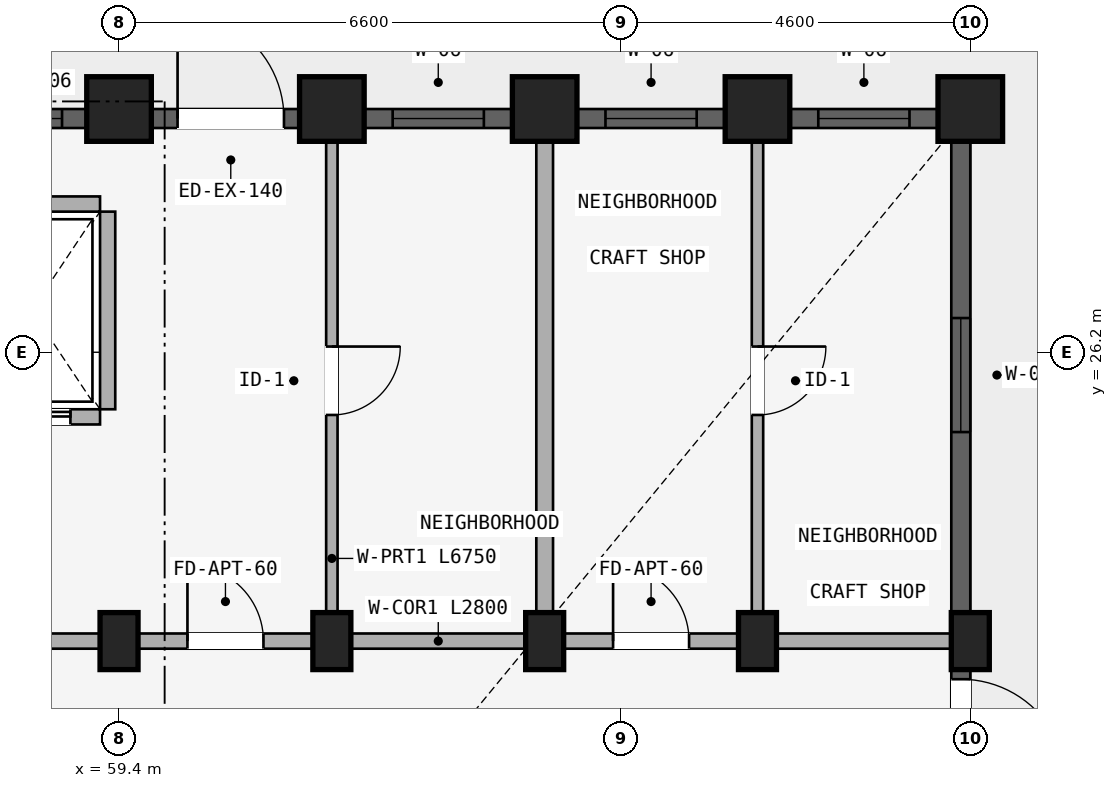
"""IFC4 building model, lengths in metres.
Left out: names, types, materials, properties, quantities, classifications, styles, units other than length and angle.
Written with IfcOpenShell. Run it as: python <this file> out.ifc"""

import sys

from ifc_helpers import new_model, si_unit, direction, frame, frame_2d, origin, origin_2d, place, context, subcontext, project, spatial, rectangle, extrude, element, fill, save


model = new_model("IFC4")
c1 = context("Model", 3, precision=1e-05, world=origin(), true_north=direction((0.0, 1.0)))
c2 = subcontext(c1, "Body", "Model", "MODEL_VIEW")
j1 = project(units=[si_unit("LENGTHUNIT", "METRE"), si_unit("PLANEANGLEUNIT", "RADIAN")], contexts=[c1])
p1 = place(None, origin())
s1 = spatial("IfcSite", under=j1, at=p1, CompositionType="ELEMENT")
p2 = place(p1, origin())
s2 = spatial("IfcBuilding", under=s1, at=p2, CompositionType="ELEMENT")
p3 = place(p2, origin())
s3 = spatial("IfcBuildingStorey", under=s2, at=p3, CompositionType="ELEMENT", Elevation=0.0)
p4 = place(p3, frame((59.4, 29.4, 0.0), z_axis=(0.0, 0.0, 1.0), x_axis=(1.0, 0.0, 0.0)))
e1 = element("IfcColumn", 1, at=p4, inside=s3, PredefinedType="COLUMN", context=c2, shape_type="SweptSolid", body=[
    extrude(rectangle(XDim=0.85, YDim=0.85, at=origin_2d()), origin(), (0.0, 0.0, 1.0), 4.15),
])
p5 = place(p3, frame((59.4, 22.4, 0.0), z_axis=(0.0, 0.0, 1.0), x_axis=(1.0, 0.0, 0.0)))
e2 = element("IfcColumn", 2, at=p5, inside=s3, PredefinedType="COLUMN", context=c2, shape_type="SweptSolid", body=[
    extrude(rectangle(XDim=0.5, YDim=0.75, at=origin_2d()), origin(), (0.0, 0.0, 1.0), 4.15),
])
p6 = place(p3, frame((62.2, 29.4, 0.0), z_axis=(0.0, 0.0, 1.0), x_axis=(1.0, 0.0, 0.0)))
e3 = element("IfcColumn", 3, at=p6, inside=s3, PredefinedType="COLUMN", context=c2, shape_type="SweptSolid", body=[
    extrude(rectangle(XDim=0.85, YDim=0.85, at=origin_2d()), origin(), (0.0, 0.0, 1.0), 4.15),
])
p7 = place(p3, frame((62.2, 22.4, 0.0), z_axis=(0.0, 0.0, 1.0), x_axis=(1.0, 0.0, 0.0)))
e4 = element("IfcColumn", 4, at=p7, inside=s3, PredefinedType="COLUMN", context=c2, shape_type="SweptSolid", body=[
    extrude(rectangle(XDim=0.5, YDim=0.75, at=origin_2d()), origin(), (0.0, 0.0, 1.0), 4.15),
])
p8 = place(p3, frame((65.0, 29.4, 0.0), z_axis=(0.0, 0.0, 1.0), x_axis=(1.0, 0.0, 0.0)))
e5 = element("IfcColumn", 5, at=p8, inside=s3, PredefinedType="COLUMN", context=c2, shape_type="SweptSolid", body=[
    extrude(rectangle(XDim=0.85, YDim=0.85, at=origin_2d()), origin(), (0.0, 0.0, 1.0), 4.15),
])
p9 = place(p3, frame((65.0, 22.4, 0.0), z_axis=(0.0, 0.0, 1.0), x_axis=(1.0, 0.0, 0.0)))
e6 = element("IfcColumn", 6, at=p9, inside=s3, PredefinedType="COLUMN", context=c2, shape_type="SweptSolid", body=[
    extrude(rectangle(XDim=0.5, YDim=0.75, at=origin_2d()), origin(), (0.0, 0.0, 1.0), 4.15),
])
p10 = place(p3, frame((67.8, 29.4, 0.0), z_axis=(0.0, 0.0, 1.0), x_axis=(1.0, 0.0, 0.0)))
e7 = element("IfcColumn", 7, at=p10, inside=s3, PredefinedType="COLUMN", context=c2, shape_type="SweptSolid", body=[
    extrude(rectangle(XDim=0.85, YDim=0.85, at=origin_2d()), origin(), (0.0, 0.0, 1.0), 4.15),
])
p11 = place(p3, frame((67.8, 22.4, 0.0), z_axis=(0.0, 0.0, 1.0), x_axis=(1.0, 0.0, 0.0)))
e8 = element("IfcColumn", 8, at=p11, inside=s3, PredefinedType="COLUMN", context=c2, shape_type="SweptSolid", body=[
    extrude(rectangle(XDim=0.5, YDim=0.75, at=origin_2d()), origin(), (0.0, 0.0, 1.0), 4.15),
])
p12 = place(p3, frame((70.6, 29.4, 0.0), z_axis=(0.0, 0.0, 1.0), x_axis=(1.0, 0.0, 0.0)))
e9 = element("IfcColumn", 9, at=p12, inside=s3, PredefinedType="COLUMN", context=c2, shape_type="SweptSolid", body=[
    extrude(rectangle(XDim=0.85, YDim=0.85, at=origin_2d()), origin(), (0.0, 0.0, 1.0), 4.15),
])
p13 = place(p3, frame((70.6, 22.4, 0.0), z_axis=(0.0, 0.0, 1.0), x_axis=(1.0, 0.0, 0.0)))
e10 = element("IfcColumn", 10, at=p13, inside=s3, PredefinedType="COLUMN", context=c2, shape_type="SweptSolid", body=[
    extrude(rectangle(XDim=0.5, YDim=0.75, at=origin_2d()), origin(), (0.0, 0.0, 1.0), 4.15),
])
p14 = place(p3, frame((59.25, 28.05, 0.0), z_axis=(0.0, 0.0, 1.0), x_axis=(0.0, -1.0, 0.0)))
e11 = element("IfcWall", 11, at=p14, inside=s3, PredefinedType="STANDARD", context=c2, shape_type="SweptSolid", body=[
    extrude(rectangle(XDim=2.6, YDim=0.2, at=frame_2d((1.3, 0.0))), origin(), (0.0, 0.0, 1.0), 3.492),
])
p15 = place(p3, frame((57.35, 28.15, 0.0), z_axis=(0.0, 0.0, 1.0), x_axis=(1.0, 0.0, 0.0)))
e12 = element("IfcWall", 12, at=p15, inside=s3, PredefinedType="STANDARD", context=c2, shape_type="SweptSolid", body=[
    extrude(rectangle(XDim=1.8, YDim=0.2, at=frame_2d((0.9, 0.0))), origin(), (0.0, 0.0, 1.0), 4.15),
])
p16 = place(p3, frame((57.35, 25.35, 0.0), z_axis=(0.0, 0.0, 1.0), x_axis=(1.0, 0.0, 0.0)))
e13 = element("IfcWall", 13, at=p16, inside=s3, PredefinedType="STANDARD", context=c2, shape_type="SweptSolid", body=[
    extrude(rectangle(XDim=1.8, YDim=0.2, at=frame_2d((0.9, 0.0))), origin(), (0.0, 0.0, 1.0), 4.15),
])
p17 = place(p16, frame((0.39, 0.0, 0.0)))
e14 = element("IfcOpeningElement", 14, at=p17, cuts=e13, PredefinedType="OPENING", context=c2, shape_type="SweptSolid", body=[
    extrude(rectangle(XDim=1.02, YDim=2.15, at=frame_2d((0.51, 1.075))), frame((0.0, 0.11, 0.0), z_axis=(0.0, -1.0, 0.0), x_axis=(1.0, 0.0, 0.0)), (0.0, 0.0, 1.0), 0.22),
])
p18 = place(p3, frame((53.75, 22.4, 0.0), z_axis=(0.0, 0.0, 1.0), x_axis=(1.0, 0.0, 0.0)))
e15 = element("IfcWall", 15, at=p18, inside=s3, PredefinedType="STANDARD", context=c2, shape_type="SweptSolid", body=[
    extrude(rectangle(XDim=5.6, YDim=0.2, at=frame_2d((2.8, 0.0))), origin(), (0.0, 0.0, 1.0), 3.492),
])
p19 = place(p18, frame((1.91, 0.0, 0.0)))
e16 = element("IfcOpeningElement", 16, at=p19, cuts=e15, PredefinedType="OPENING", context=c2, shape_type="SweptSolid", body=[
    extrude(rectangle(XDim=1.22, YDim=2.15, at=frame_2d((0.61, 1.075))), frame((0.0, 0.11, 0.0), z_axis=(0.0, -1.0, 0.0), x_axis=(1.0, 0.0, 0.0)), (0.0, 0.0, 1.0), 0.22),
])
p20 = place(p3, frame((59.4, 22.4, 0.0), z_axis=(0.0, 0.0, 1.0), x_axis=(1.0, 0.0, 0.0)))
e17 = element("IfcWall", 17, at=p20, inside=s3, PredefinedType="STANDARD", context=c2, shape_type="SweptSolid", body=[
    extrude(rectangle(XDim=2.8, YDim=0.2, at=frame_2d((1.4, 0.0))), origin(), (0.0, 0.0, 1.0), 3.492),
])
p21 = place(p20, frame((0.9, 0.0, 0.0)))
e18 = element("IfcOpeningElement", 18, at=p21, cuts=e17, PredefinedType="OPENING", context=c2, shape_type="SweptSolid", body=[
    extrude(rectangle(XDim=1.0, YDim=2.15, at=frame_2d((0.5, 1.075))), frame((0.0, 0.11, 0.0), z_axis=(0.0, -1.0, 0.0), x_axis=(1.0, 0.0, 0.0)), (0.0, 0.0, 1.0), 0.22),
])
p22 = place(p3, frame((62.2, 22.4, 0.0), z_axis=(0.0, 0.0, 1.0), x_axis=(1.0, 0.0, 0.0)))
e19 = element("IfcWall", 19, at=p22, inside=s3, PredefinedType="STANDARD", context=c2, shape_type="SweptSolid", body=[
    extrude(rectangle(XDim=2.8, YDim=0.2, at=frame_2d((1.4, 0.0))), origin(), (0.0, 0.0, 1.0), 3.492),
])
p23 = place(p3, frame((65.0, 22.4, 0.0), z_axis=(0.0, 0.0, 1.0), x_axis=(1.0, 0.0, 0.0)))
e20 = element("IfcWall", 20, at=p23, inside=s3, PredefinedType="STANDARD", context=c2, shape_type="SweptSolid", body=[
    extrude(rectangle(XDim=2.8, YDim=0.2, at=frame_2d((1.4, 0.0))), origin(), (0.0, 0.0, 1.0), 3.492),
])
p24 = place(p23, frame((0.9, 0.0, 0.0)))
e21 = element("IfcOpeningElement", 21, at=p24, cuts=e20, PredefinedType="OPENING", context=c2, shape_type="SweptSolid", body=[
    extrude(rectangle(XDim=1.0, YDim=2.15, at=frame_2d((0.5, 1.075))), frame((0.0, 0.11, 0.0), z_axis=(0.0, -1.0, 0.0), x_axis=(1.0, 0.0, 0.0)), (0.0, 0.0, 1.0), 0.22),
])
p25 = place(p3, frame((67.8, 22.4, 0.0), z_axis=(0.0, 0.0, 1.0), x_axis=(1.0, 0.0, 0.0)))
e22 = element("IfcWall", 22, at=p25, inside=s3, PredefinedType="STANDARD", context=c2, shape_type="SweptSolid", body=[
    extrude(rectangle(XDim=2.8, YDim=0.2, at=frame_2d((1.4, 0.0))), origin(), (0.0, 0.0, 1.0), 3.492),
])
p26 = place(p3, frame((62.2, 29.2, 0.0), z_axis=(0.0, 0.0, 1.0), x_axis=(0.0, -1.0, 0.0)))
e23 = element("IfcWall", 23, at=p26, inside=s3, PredefinedType="PARTITIONING", context=c2, shape_type="SweptSolid", body=[
    extrude(rectangle(XDim=6.75, YDim=0.15, at=frame_2d((3.375, 0.0))), origin(), (0.0, 0.0, 1.0), 3.492),
])
p27 = place(p26, frame((2.925, 0.0, 0.0)))
e24 = element("IfcOpeningElement", 24, at=p27, cuts=e23, PredefinedType="OPENING", context=c2, shape_type="SweptSolid", body=[
    extrude(rectangle(XDim=0.9, YDim=2.1, at=frame_2d((0.45, 1.05))), frame((0.0, 0.085, 0.0), z_axis=(0.0, -1.0, 0.0), x_axis=(1.0, 0.0, 0.0)), (0.0, 0.0, 1.0), 0.17),
])
p28 = place(p3, frame((65.0, 29.2, 0.0), z_axis=(0.0, 0.0, 1.0), x_axis=(0.0, -1.0, 0.0)))
e25 = element("IfcWall", 25, at=p28, inside=s3, PredefinedType="STANDARD", context=c2, shape_type="SweptSolid", body=[
    extrude(rectangle(XDim=6.75, YDim=0.22, at=frame_2d((3.375, 0.0))), origin(), (0.0, 0.0, 1.0), 3.492),
])
p29 = place(p3, frame((67.8, 29.2, 0.0), z_axis=(0.0, 0.0, 1.0), x_axis=(0.0, -1.0, 0.0)))
e26 = element("IfcWall", 26, at=p29, inside=s3, PredefinedType="PARTITIONING", context=c2, shape_type="SweptSolid", body=[
    extrude(rectangle(XDim=6.75, YDim=0.15, at=frame_2d((3.375, 0.0))), origin(), (0.0, 0.0, 1.0), 3.492),
])
p30 = place(p29, frame((2.925, 0.0, 0.0)))
e27 = element("IfcOpeningElement", 27, at=p30, cuts=e26, PredefinedType="OPENING", context=c2, shape_type="SweptSolid", body=[
    extrude(rectangle(XDim=0.9, YDim=2.1, at=frame_2d((0.45, 1.05))), frame((0.0, 0.085, 0.0), z_axis=(0.0, -1.0, 0.0), x_axis=(1.0, 0.0, 0.0)), (0.0, 0.0, 1.0), 0.17),
])
p31 = place(p3, frame((56.628, 29.275, 0.0), z_axis=(0.0, 0.0, 1.0), x_axis=(1.0, 0.0, 0.0)))
e28 = element("IfcWall", 28, at=p31, inside=s3, PredefinedType="STANDARD", context=c2, shape_type="SweptSolid", body=[
    extrude(rectangle(XDim=2.422, YDim=0.25, at=frame_2d((1.211, 0.0))), origin(), (0.0, 0.0, 1.0), 3.692),
])
p32 = place(p31, frame((0.822, 0.0, 0.88)))
e29 = element("IfcOpeningElement", 29, at=p32, cuts=e28, PredefinedType="OPENING", context=c2, shape_type="SweptSolid", body=[
    extrude(rectangle(XDim=1.2, YDim=1.5, at=frame_2d((0.6, 0.75))), frame((0.0, 0.135, 0.0), z_axis=(0.0, -1.0, 0.0), x_axis=(1.0, 0.0, 0.0)), (0.0, 0.0, 1.0), 0.27),
])
p33 = place(p3, frame((59.82, 29.275, 0.0), z_axis=(0.0, 0.0, 1.0), x_axis=(1.0, 0.0, 0.0)))
e30 = element("IfcWall", 30, at=p33, inside=s3, PredefinedType="STANDARD", context=c2, shape_type="SweptSolid", body=[
    extrude(rectangle(XDim=1.96, YDim=0.25, at=frame_2d((0.98, 0.0))), origin(), (0.0, 0.0, 1.0), 3.692),
])
p34 = place(p33, frame((0.35, 0.0, 0.0)))
e31 = element("IfcOpeningElement", 31, at=p34, cuts=e30, PredefinedType="OPENING", context=c2, shape_type="SweptSolid", body=[
    extrude(rectangle(XDim=1.4, YDim=2.15, at=frame_2d((0.7, 1.075))), frame((0.0, 0.135, 0.0), z_axis=(0.0, -1.0, 0.0), x_axis=(1.0, 0.0, 0.0)), (0.0, 0.0, 1.0), 0.27),
])
p35 = place(p3, frame((62.62, 29.275, 0.0), z_axis=(0.0, 0.0, 1.0), x_axis=(1.0, 0.0, 0.0)))
e32 = element("IfcWall", 32, at=p35, inside=s3, PredefinedType="STANDARD", context=c2, shape_type="SweptSolid", body=[
    extrude(rectangle(XDim=1.96, YDim=0.25, at=frame_2d((0.98, 0.0))), origin(), (0.0, 0.0, 1.0), 3.692),
])
p36 = place(p35, frame((0.38, 0.0, 0.88)))
e33 = element("IfcOpeningElement", 33, at=p36, cuts=e32, PredefinedType="OPENING", context=c2, shape_type="SweptSolid", body=[
    extrude(rectangle(XDim=1.2, YDim=1.5, at=frame_2d((0.6, 0.75))), frame((0.0, 0.135, 0.0), z_axis=(0.0, -1.0, 0.0), x_axis=(1.0, 0.0, 0.0)), (0.0, 0.0, 1.0), 0.27),
])
p37 = place(p3, frame((65.42, 29.275, 0.0), z_axis=(0.0, 0.0, 1.0), x_axis=(1.0, 0.0, 0.0)))
e34 = element("IfcWall", 34, at=p37, inside=s3, PredefinedType="STANDARD", context=c2, shape_type="SweptSolid", body=[
    extrude(rectangle(XDim=1.96, YDim=0.25, at=frame_2d((0.98, 0.0))), origin(), (0.0, 0.0, 1.0), 3.692),
])
p38 = place(p37, frame((0.38, 0.0, 0.88)))
e35 = element("IfcOpeningElement", 35, at=p38, cuts=e34, PredefinedType="OPENING", context=c2, shape_type="SweptSolid", body=[
    extrude(rectangle(XDim=1.2, YDim=1.5, at=frame_2d((0.6, 0.75))), frame((0.0, 0.135, 0.0), z_axis=(0.0, -1.0, 0.0), x_axis=(1.0, 0.0, 0.0)), (0.0, 0.0, 1.0), 0.27),
])
p39 = place(p3, frame((68.22, 29.275, 0.0), z_axis=(0.0, 0.0, 1.0), x_axis=(1.0, 0.0, 0.0)))
e36 = element("IfcWall", 36, at=p39, inside=s3, PredefinedType="STANDARD", context=c2, shape_type="SweptSolid", body=[
    extrude(rectangle(XDim=1.96, YDim=0.25, at=frame_2d((0.98, 0.0))), origin(), (0.0, 0.0, 1.0), 3.692),
])
p40 = place(p39, frame((0.38, 0.0, 0.88)))
e37 = element("IfcOpeningElement", 37, at=p40, cuts=e36, PredefinedType="OPENING", context=c2, shape_type="SweptSolid", body=[
    extrude(rectangle(XDim=1.2, YDim=1.5, at=frame_2d((0.6, 0.75))), frame((0.0, 0.135, 0.0), z_axis=(0.0, -1.0, 0.0), x_axis=(1.0, 0.0, 0.0)), (0.0, 0.0, 1.0), 0.27),
])
p41 = place(p3, frame((70.475, 28.98, 0.0), z_axis=(0.0, 0.0, 1.0), x_axis=(0.0, -1.0, 0.0)))
e38 = element("IfcWall", 38, at=p41, inside=s3, PredefinedType="STANDARD", context=c2, shape_type="SweptSolid", body=[
    extrude(rectangle(XDim=6.201, YDim=0.25, at=frame_2d((3.101, 0.0))), origin(), (0.0, 0.0, 1.0), 3.492),
])
p42 = place(p41, frame((2.33, 0.0, 0.88)))
e39 = element("IfcOpeningElement", 39, at=p42, cuts=e38, PredefinedType="OPENING", context=c2, shape_type="SweptSolid", body=[
    extrude(rectangle(XDim=1.5, YDim=1.65, at=frame_2d((0.75, 0.825))), frame((0.0, 0.135, 0.0), z_axis=(0.0, -1.0, 0.0), x_axis=(1.0, 0.0, 0.0)), (0.0, 0.0, 1.0), 0.27),
])
p43 = place(p3, frame((70.475, 22.021, 0.0), z_axis=(0.0, 0.0, 1.0), x_axis=(0.0, -1.0, 0.0)))
e40 = element("IfcWall", 40, at=p43, inside=s3, PredefinedType="STANDARD", context=c2, shape_type="SweptSolid", body=[
    extrude(rectangle(XDim=1.643, YDim=0.25, at=frame_2d((0.822, 0.0))), origin(), (0.0, 0.0, 1.0), 3.492),
])
p44 = place(p43, frame((0.123, 0.0, 0.0)))
e41 = element("IfcOpeningElement", 41, at=p44, cuts=e40, PredefinedType="OPENING", context=c2, shape_type="SweptSolid", body=[
    extrude(rectangle(XDim=1.4, YDim=2.15, at=frame_2d((0.7, 1.075))), frame((0.0, 0.135, 0.0), z_axis=(0.0, -1.0, 0.0), x_axis=(1.0, 0.0, 0.0)), (0.0, 0.0, 1.0), 0.27),
])
p45 = place(p32, origin())
e42 = element("IfcWindow", 42, at=p45, inside=s3, PartitioningType="SINGLE_PANEL", PredefinedType="WINDOW", context=c2, shape_type="SweptSolid", body=[
    extrude(rectangle(XDim=1.2, YDim=1.5, at=frame_2d((0.6, 0.75))), frame((0.0, 0.03, 0.0), z_axis=(0.0, -1.0, 0.0), x_axis=(1.0, 0.0, 0.0)), (0.0, 0.0, 1.0), 0.06),
])
fill(e29, e42)
p46 = place(p36, origin())
e43 = element("IfcWindow", 43, at=p46, inside=s3, PartitioningType="SINGLE_PANEL", PredefinedType="WINDOW", context=c2, shape_type="SweptSolid", body=[
    extrude(rectangle(XDim=1.2, YDim=1.5, at=frame_2d((0.6, 0.75))), frame((0.0, 0.03, 0.0), z_axis=(0.0, -1.0, 0.0), x_axis=(1.0, 0.0, 0.0)), (0.0, 0.0, 1.0), 0.06),
])
fill(e33, e43)
p47 = place(p38, origin())
e44 = element("IfcWindow", 44, at=p47, inside=s3, PartitioningType="SINGLE_PANEL", PredefinedType="WINDOW", context=c2, shape_type="SweptSolid", body=[
    extrude(rectangle(XDim=1.2, YDim=1.5, at=frame_2d((0.6, 0.75))), frame((0.0, 0.03, 0.0), z_axis=(0.0, -1.0, 0.0), x_axis=(1.0, 0.0, 0.0)), (0.0, 0.0, 1.0), 0.06),
])
fill(e35, e44)
p48 = place(p40, origin())
e45 = element("IfcWindow", 45, at=p48, inside=s3, PartitioningType="SINGLE_PANEL", PredefinedType="WINDOW", context=c2, shape_type="SweptSolid", body=[
    extrude(rectangle(XDim=1.2, YDim=1.5, at=frame_2d((0.6, 0.75))), frame((0.0, 0.03, 0.0), z_axis=(0.0, -1.0, 0.0), x_axis=(1.0, 0.0, 0.0)), (0.0, 0.0, 1.0), 0.06),
])
fill(e37, e45)
p49 = place(p42, origin())
e46 = element("IfcWindow", 46, at=p49, inside=s3, PartitioningType="DOUBLE_PANEL_VERTICAL", PredefinedType="WINDOW", context=c2, shape_type="SweptSolid", body=[
    extrude(rectangle(XDim=1.5, YDim=1.65, at=frame_2d((0.75, 0.825))), frame((0.0, 0.03, 0.0), z_axis=(0.0, -1.0, 0.0), x_axis=(1.0, 0.0, 0.0)), (0.0, 0.0, 1.0), 0.06),
])
fill(e39, e46)
p50 = place(p17, origin())
e47 = element("IfcDoor", 47, at=p50, inside=s3, OperationType="SLIDING_TO_RIGHT", PredefinedType="DOOR", context=c2, shape_type="SweptSolid", body=[
    extrude(rectangle(XDim=1.02, YDim=2.15, at=frame_2d((0.51, 1.075))), frame((0.0, 0.025, 0.0), z_axis=(0.0, -1.0, 0.0), x_axis=(1.0, 0.0, 0.0)), (0.0, 0.0, 1.0), 0.05),
])
fill(e14, e47)
p51 = place(p21, frame((1.0, 0.0, 0.0), z_axis=(0.0, 0.0, 1.0), x_axis=(-1.0, 0.0, 0.0)))
e48 = element("IfcDoor", 48, at=p51, inside=s3, OperationType="SINGLE_SWING_RIGHT", PredefinedType="DOOR", context=c2, shape_type="SweptSolid", body=[
    extrude(rectangle(XDim=1.0, YDim=2.15, at=frame_2d((0.5, 1.075))), frame((0.0, 0.025, 0.0), z_axis=(0.0, -1.0, 0.0), x_axis=(1.0, 0.0, 0.0)), (0.0, 0.0, 1.0), 0.05),
])
fill(e18, e48)
p52 = place(p24, frame((1.0, 0.0, 0.0), z_axis=(0.0, 0.0, 1.0), x_axis=(-1.0, 0.0, 0.0)))
e49 = element("IfcDoor", 49, at=p52, inside=s3, OperationType="SINGLE_SWING_RIGHT", PredefinedType="DOOR", context=c2, shape_type="SweptSolid", body=[
    extrude(rectangle(XDim=1.0, YDim=2.15, at=frame_2d((0.5, 1.075))), frame((0.0, 0.025, 0.0), z_axis=(0.0, -1.0, 0.0), x_axis=(1.0, 0.0, 0.0)), (0.0, 0.0, 1.0), 0.05),
])
fill(e21, e49)
p53 = place(p27, origin())
e50 = element("IfcDoor", 50, at=p53, inside=s3, OperationType="SINGLE_SWING_LEFT", PredefinedType="DOOR", context=c2, shape_type="SweptSolid", body=[
    extrude(rectangle(XDim=0.9, YDim=2.1, at=frame_2d((0.45, 1.05))), frame((0.0, 0.025, 0.0), z_axis=(0.0, -1.0, 0.0), x_axis=(1.0, 0.0, 0.0)), (0.0, 0.0, 1.0), 0.05),
])
fill(e24, e50)
p54 = place(p30, frame((0.9, 0.0, 0.0), z_axis=(0.0, 0.0, 1.0), x_axis=(-1.0, 0.0, 0.0)))
e51 = element("IfcDoor", 51, at=p54, inside=s3, OperationType="SINGLE_SWING_RIGHT", PredefinedType="DOOR", context=c2, shape_type="SweptSolid", body=[
    extrude(rectangle(XDim=0.9, YDim=2.1, at=frame_2d((0.45, 1.05))), frame((0.0, 0.025, 0.0), z_axis=(0.0, -1.0, 0.0), x_axis=(1.0, 0.0, 0.0)), (0.0, 0.0, 1.0), 0.05),
])
fill(e27, e51)
p55 = place(p34, origin())
e52 = element("IfcDoor", 52, at=p55, inside=s3, OperationType="SINGLE_SWING_LEFT", PredefinedType="DOOR", context=c2, shape_type="SweptSolid", body=[
    extrude(rectangle(XDim=1.4, YDim=2.15, at=frame_2d((0.7, 1.075))), frame((0.0, 0.025, 0.0), z_axis=(0.0, -1.0, 0.0), x_axis=(1.0, 0.0, 0.0)), (0.0, 0.0, 1.0), 0.05),
])
fill(e31, e52)
p56 = place(p44, origin())
e53 = element("IfcDoor", 53, at=p56, inside=s3, OperationType="SINGLE_SWING_RIGHT", PredefinedType="DOOR", context=c2, shape_type="SweptSolid", body=[
    extrude(rectangle(XDim=1.4, YDim=2.15, at=frame_2d((0.7, 1.075))), frame((0.0, 0.025, 0.0), z_axis=(0.0, -1.0, 0.0), x_axis=(1.0, 0.0, 0.0)), (0.0, 0.0, 1.0), 0.05),
])
fill(e41, e53)
save(model, sys.argv[1])
